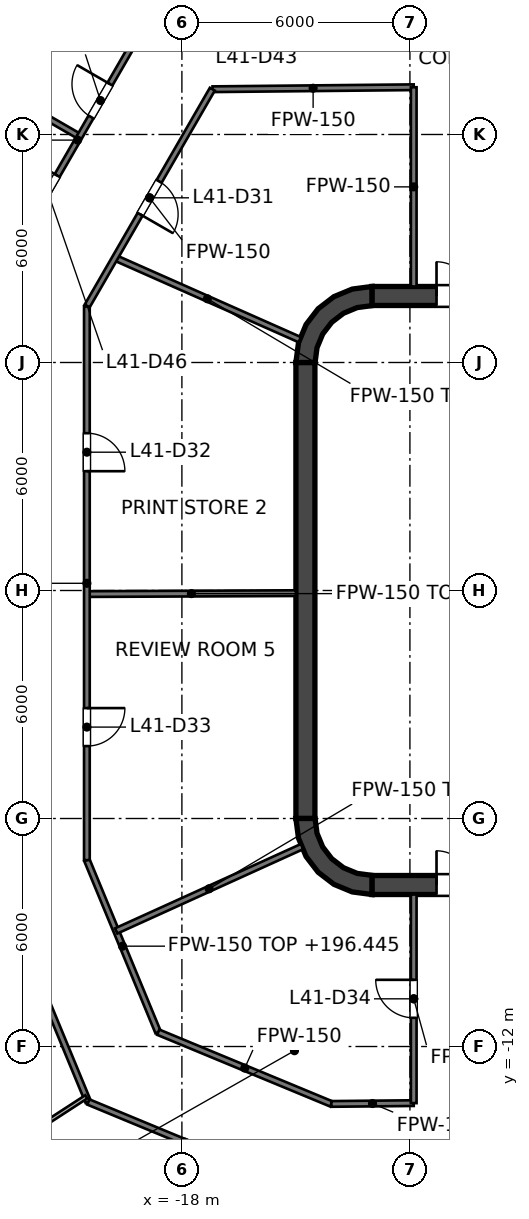
"""IFC4 building model, lengths in metres.
Left out: names, types, materials, properties, quantities, classifications, styles, units other than length and angle.
Written with IfcOpenShell. Run it as: python <this file> out.ifc"""

import sys

from ifc_helpers import new_model, si_unit, direction, frame, frame_2d, origin, place, context, subcontext, project, spatial, polyline, rectangle, outline, extrude, element, fill, save


model = new_model("IFC4")
c1 = context("Model", 3, precision=1e-05, world=origin(), true_north=direction((0.0, 1.0)))
c2 = subcontext(c1, "Body", "Model", "MODEL_VIEW")
j1 = project(units=[si_unit("LENGTHUNIT", "METRE"), si_unit("PLANEANGLEUNIT", "RADIAN")], contexts=[c1])
p1 = place(None, origin())
s1 = spatial("IfcSite", under=j1, at=p1, CompositionType="ELEMENT")
p2 = place(p1, origin())
s2 = spatial("IfcBuilding", under=s1, at=p2, CompositionType="ELEMENT")
p3 = place(p2, frame((0.0, 0.0, 193.6)))
s3 = spatial("IfcBuildingStorey", under=s2, at=p3, CompositionType="ELEMENT", Elevation=193.6)
p4 = place(p3, frame((-13.0, 7.75, 0.0), z_axis=(0.0, 0.0, 1.0), x_axis=(1.0, 0.0, 0.0)))
e1 = element("IfcWall", 1, at=p4, inside=s3, PredefinedType="SHEAR", context=c2, shape_type="SweptSolid", body=[
    extrude(rectangle(XDim=26.0, YDim=0.5, at=frame_2d((13.0, 0.0))), origin(), (0.0, 0.0, 1.0), 4.0),
])
p5 = place(p4, frame((1.7, 0.0, 0.0)))
e2 = element("IfcOpeningElement", 2, at=p5, cuts=e1, PredefinedType="OPENING", context=c2, shape_type="SweptSolid", body=[
    extrude(rectangle(XDim=1.8, YDim=2.1, at=frame_2d((0.9, 1.05))), frame((0.0, 0.25, 0.0), z_axis=(0.0, -1.0, 0.0), x_axis=(1.0, 0.0, 0.0)), (0.0, 0.0, 1.0), 0.5),
])
p6 = place(p4, frame((22.5, 0.0, 0.0)))
e3 = element("IfcOpeningElement", 3, at=p6, cuts=e1, PredefinedType="OPENING", context=c2, shape_type="SweptSolid", body=[
    extrude(rectangle(XDim=1.8, YDim=2.1, at=frame_2d((0.9, 1.05))), frame((0.0, 0.25, 0.0), z_axis=(0.0, -1.0, 0.0), x_axis=(1.0, 0.0, 0.0)), (0.0, 0.0, 1.0), 0.5),
])
p7 = place(p3, frame((-13.0, -7.75, 0.0), z_axis=(0.0, 0.0, 1.0), x_axis=(1.0, 0.0, 0.0)))
e4 = element("IfcWall", 4, at=p7, inside=s3, PredefinedType="SHEAR", context=c2, shape_type="SweptSolid", body=[
    extrude(rectangle(XDim=26.0, YDim=0.5, at=frame_2d((13.0, 0.0))), origin(), (0.0, 0.0, 1.0), 4.0),
])
p8 = place(p7, frame((1.7, 0.0, 0.0)))
e5 = element("IfcOpeningElement", 5, at=p8, cuts=e4, PredefinedType="OPENING", context=c2, shape_type="SweptSolid", body=[
    extrude(rectangle(XDim=1.8, YDim=2.1, at=frame_2d((0.9, 1.05))), frame((0.0, 0.25, 0.0), z_axis=(0.0, -1.0, 0.0), x_axis=(1.0, 0.0, 0.0)), (0.0, 0.0, 1.0), 0.5),
])
p9 = place(p7, frame((22.5, 0.0, 0.0)))
e6 = element("IfcOpeningElement", 6, at=p9, cuts=e4, PredefinedType="OPENING", context=c2, shape_type="SweptSolid", body=[
    extrude(rectangle(XDim=1.8, YDim=2.1, at=frame_2d((0.9, 1.05))), frame((0.0, 0.25, 0.0), z_axis=(0.0, -1.0, 0.0), x_axis=(1.0, 0.0, 0.0)), (0.0, 0.0, 1.0), 0.5),
])
p10 = place(p3, frame((-14.75, -6.0, 0.0), z_axis=(0.0, 0.0, 1.0), x_axis=(0.0, 1.0, 0.0)))
e7 = element("IfcWall", 7, at=p10, inside=s3, PredefinedType="SHEAR", context=c2, shape_type="SweptSolid", body=[
    extrude(rectangle(XDim=12.0, YDim=0.5, at=frame_2d((6.0, 0.0))), origin(), (0.0, 0.0, 1.0), 4.0),
])
p11 = place(p3, origin())
e8 = element("IfcWall", 8, at=p11, inside=s3, PredefinedType="SHEAR", context=c2, shape_type="SweptSolid", body=[
    extrude(outline(polyline([(-15.0, 6.0), (-14.496, 6.0), (-14.445, 6.387), (-14.295, 6.748), (-14.058, 7.058), (-13.748, 7.295), (-13.387, 7.445), (-13.0, 7.496), (-13.0, 8.0), (-13.518, 7.932), (-14.0, 7.732), (-14.414, 7.414), (-14.732, 7.0), (-14.932, 6.518), (-15.0, 6.0)])), origin(), (0.0, 0.0, 1.0), 4.0),
])
e9 = element("IfcWall", 9, at=p11, inside=s3, PredefinedType="SHEAR", context=c2, shape_type="SweptSolid", body=[
    extrude(outline(polyline([(-13.0, -8.0), (-13.0, -7.496), (-13.387, -7.445), (-13.748, -7.295), (-14.058, -7.058), (-14.295, -6.748), (-14.445, -6.387), (-14.496, -6.0), (-15.0, -6.0), (-14.932, -6.518), (-14.732, -7.0), (-14.414, -7.414), (-14.0, -7.732), (-13.518, -7.932), (-13.0, -8.0)])), origin(), (0.0, 0.0, 1.0), 4.0),
])
p12 = place(p3, frame((-11.8, -7.5, 0.0), z_axis=(0.0, 0.0, 1.0), x_axis=(0.0, 1.0, 0.0)))
e10 = element("IfcWall", 10, at=p12, inside=s3, PredefinedType="SOLIDWALL", context=c2, shape_type="SweptSolid", body=[
    extrude(rectangle(XDim=15.0, YDim=0.4, at=frame_2d((7.5, 0.0))), origin(), (0.0, 0.0, 1.0), 3.7),
])
p13 = place(p12, frame((11.3, 0.0, 0.0)))
e11 = element("IfcOpeningElement", 11, at=p13, cuts=e10, PredefinedType="OPENING", context=c2, shape_type="SweptSolid", body=[
    extrude(rectangle(XDim=1.1, YDim=2.1, at=frame_2d((0.55, 1.05))), frame((0.0, 0.2, 0.0), z_axis=(0.0, -1.0, 0.0), x_axis=(1.0, 0.0, 0.0)), (0.0, 0.0, 1.0), 0.4),
])
p14 = place(p12, frame((8.4, 0.0, 0.0)))
e12 = element("IfcOpeningElement", 12, at=p14, cuts=e10, PredefinedType="OPENING", context=c2, shape_type="SweptSolid", body=[
    extrude(rectangle(XDim=1.1, YDim=2.1, at=frame_2d((0.55, 1.05))), frame((0.0, 0.2, 0.0), z_axis=(0.0, -1.0, 0.0), x_axis=(1.0, 0.0, 0.0)), (0.0, 0.0, 1.0), 0.4),
])
p15 = place(p12, frame((5.5, 0.0, 0.0)))
e13 = element("IfcOpeningElement", 13, at=p15, cuts=e10, PredefinedType="OPENING", context=c2, shape_type="SweptSolid", body=[
    extrude(rectangle(XDim=1.1, YDim=2.1, at=frame_2d((0.55, 1.05))), frame((0.0, 0.2, 0.0), z_axis=(0.0, -1.0, 0.0), x_axis=(1.0, 0.0, 0.0)), (0.0, 0.0, 1.0), 0.4),
])
p16 = place(p12, frame((13.697, 0.0, 0.0)))
e14 = element("IfcOpeningElement", 14, at=p16, cuts=e10, PredefinedType="OPENING", context=c2, shape_type="SweptSolid", body=[
    extrude(rectangle(XDim=0.9, YDim=2.1, at=frame_2d((0.45, 1.05))), frame((0.0, 0.2, 0.0), z_axis=(0.0, -1.0, 0.0), x_axis=(1.0, 0.0, 0.0)), (0.0, 0.0, 1.0), 0.4),
])
p17 = place(p12, frame((0.403, 0.0, 0.0)))
e15 = element("IfcOpeningElement", 15, at=p17, cuts=e10, PredefinedType="OPENING", context=c2, shape_type="SweptSolid", body=[
    extrude(rectangle(XDim=0.9, YDim=2.1, at=frame_2d((0.45, 1.05))), frame((0.0, 0.2, 0.0), z_axis=(0.0, -1.0, 0.0), x_axis=(1.0, 0.0, 0.0)), (0.0, 0.0, 1.0), 0.4),
])
e16 = element("IfcWall", 16, at=p11, inside=s3, PredefinedType="SOLIDWALL", context=c2, shape_type="SweptSolid", body=[
    extrude(outline(polyline([(-12.0, -5.925), (-12.0, -5.675), (-14.25, -5.675), (-14.25, -3.025), (-12.0, -3.025), (-12.0, -2.775), (-14.25, -2.775), (-14.25, -0.125), (-12.0, -0.125), (-12.0, 0.125), (-14.25, 0.125), (-14.25, 2.775), (-12.0, 2.775), (-12.0, 3.025), (-14.25, 3.025), (-14.25, 5.675), (-12.0, 5.675), (-12.0, 5.925), (-14.25, 5.925), (-14.5, 5.925), (-14.5, 5.675), (-14.5, 3.025), (-14.5, 2.775), (-14.5, 0.125), (-14.5, -0.125), (-14.5, -2.775), (-14.5, -3.025), (-14.5, -5.675), (-14.5, -5.925), (-14.25, -5.925), (-12.0, -5.925)])), origin(), (0.0, 0.0, 1.0), 3.7),
])
p18 = place(p3, frame((-22.9, -7.572, 0.0), z_axis=(0.0, 0.0, 1.0), x_axis=(0.382367581622, -0.924010298928, 0.0)))
e17 = element("IfcWall", 17, at=p18, inside=s3, PredefinedType="PARTITIONING", context=c2, shape_type="SweptSolid", body=[
    extrude(rectangle(XDim=6.374, YDim=0.15, at=frame_2d((3.187, 0.0))), origin(), (0.0, 0.0, 1.0), 2.777),
])
p19 = place(p18, frame((2.6, 0.0, 0.0)))
e18 = element("IfcOpeningElement", 18, at=p19, cuts=e17, PredefinedType="OPENING", context=c2, shape_type="SweptSolid", body=[
    extrude(rectangle(XDim=1.0, YDim=2.1, at=frame_2d((0.5, 1.05))), frame((0.0, 0.075, 0.0), z_axis=(0.0, -1.0, 0.0), x_axis=(1.0, 0.0, 0.0)), (0.0, 0.0, 1.0), 0.15),
])
p20 = place(p3, frame((-20.5, -7.095, 0.0), z_axis=(0.0, 0.0, 1.0), x_axis=(0.382364990163, -0.924011371303, 0.0)))
e19 = element("IfcWall", 19, at=p20, inside=s3, PredefinedType="PARTITIONING", context=c2, shape_type="SweptSolid", body=[
    extrude(rectangle(XDim=4.902, YDim=0.15, at=frame_2d((2.451, 0.0))), origin(), (0.0, 0.0, 1.0), 2.845),
])
p21 = place(p3, frame((-24.433, 14.106, 0.0), z_axis=(0.0, 0.0, 1.0), x_axis=(0.866048255864, -0.499960416948, 0.0)))
e20 = element("IfcWall", 20, at=p21, inside=s3, PredefinedType="PARTITIONING", context=c2, shape_type="SweptSolid", body=[
    extrude(rectangle(XDim=4.322, YDim=0.15, at=frame_2d((2.161, 0.0))), origin(), (0.0, 0.0, 1.0), 2.845),
])
p22 = place(p3, frame((-19.76, 8.755, 0.0), z_axis=(0.0, 0.0, 1.0), x_axis=(0.91424834547, -0.405154245695, 0.0)))
e21 = element("IfcWall", 21, at=p22, inside=s3, PredefinedType="PARTITIONING", context=c2, shape_type="SweptSolid", body=[
    extrude(rectangle(XDim=5.318, YDim=0.15, at=frame_2d((2.659, 0.0))), origin(), (0.0, 0.0, 1.0), 2.845),
])
p23 = place(p3, frame((-20.46, -13.46, 0.0), z_axis=(0.0, 0.0, 1.0), x_axis=(0.923801547606, -0.382871650349, 0.0)))
e22 = element("IfcWall", 22, at=p23, inside=s3, PredefinedType="PARTITIONING", context=c2, shape_type="SweptSolid", body=[
    extrude(rectangle(XDim=6.415, YDim=0.15, at=frame_2d((3.208, 0.0))), origin(), (0.0, 0.0, 1.0), 2.777),
])
p24 = place(p23, frame((2.707, 0.0, 0.0)))
e23 = element("IfcOpeningElement", 23, at=p24, cuts=e22, PredefinedType="OPENING", context=c2, shape_type="SweptSolid", body=[
    extrude(rectangle(XDim=1.0, YDim=2.1, at=frame_2d((0.5, 1.05))), frame((0.0, 0.075, 0.0), z_axis=(0.0, -1.0, 0.0), x_axis=(1.0, 0.0, 0.0)), (0.0, 0.0, 1.0), 0.15),
])
p25 = place(p3, frame((-18.623, -11.623, 0.0), z_axis=(0.0, 0.0, 1.0), x_axis=(0.923791670587, -0.38289548098, 0.0)))
e24 = element("IfcWall", 24, at=p25, inside=s3, PredefinedType="PARTITIONING", context=c2, shape_type="SweptSolid", body=[
    extrude(rectangle(XDim=4.931, YDim=0.15, at=frame_2d((2.465, 0.0))), origin(), (0.0, 0.0, 1.0), 2.777),
])
p26 = place(p3, frame((-20.5, -0.094, 0.0), z_axis=(0.0, 0.0, 1.0), x_axis=(0.999990148138, 0.004438876723, 0.0)))
e25 = element("IfcWall", 25, at=p26, inside=s3, PredefinedType="PARTITIONING", context=c2, shape_type="SweptSolid", body=[
    extrude(rectangle(XDim=5.5, YDim=0.15, at=frame_2d((2.75, 0.0))), origin(), (0.0, 0.0, 1.0), 2.768),
])
p27 = place(p3, frame((-14.068, -13.511, 0.0), z_axis=(0.0, 0.0, 1.0), x_axis=(0.999950911515, 0.009908307647, 0.0)))
e26 = element("IfcWall", 26, at=p27, inside=s3, PredefinedType="PARTITIONING", context=c2, shape_type="SweptSolid", body=[
    extrude(rectangle(XDim=2.168, YDim=0.15, at=frame_2d((1.084, 0.0))), origin(), (0.0, 0.0, 1.0), 2.777),
])
p28 = place(p3, frame((-17.194, 13.191, 0.0), z_axis=(0.0, 0.0, 1.0), x_axis=(0.999950853109, 0.009914200296, 0.0)))
e27 = element("IfcWall", 27, at=p28, inside=s3, PredefinedType="PARTITIONING", context=c2, shape_type="SweptSolid", body=[
    extrude(rectangle(XDim=5.294, YDim=0.15, at=frame_2d((2.647, 0.0))), origin(), (0.0, 0.0, 1.0), 2.777),
])
p29 = place(p3, frame((-19.728, -8.958, 0.0), z_axis=(0.0, 0.0, 1.0), x_axis=(0.910629511797, 0.413223779863, 0.0)))
e28 = element("IfcWall", 28, at=p29, inside=s3, PredefinedType="PARTITIONING", context=c2, shape_type="SweptSolid", body=[
    extrude(rectangle(XDim=5.368, YDim=0.15, at=frame_2d((2.684, 0.0))), origin(), (0.0, 0.0, 1.0), 3.7),
])
p30 = place(p3, frame((-20.5, 7.474, 0.0), z_axis=(0.0, 0.0, 1.0), x_axis=(0.499957196903, 0.866050114754, 0.0)))
e29 = element("IfcWall", 29, at=p30, inside=s3, PredefinedType="PARTITIONING", context=c2, shape_type="SweptSolid", body=[
    extrude(rectangle(XDim=6.602, YDim=0.15, at=frame_2d((3.301, 0.0))), origin(), (0.0, 0.0, 1.0), 2.777),
])
p31 = place(p30, frame((2.802, 0.0, 0.0)))
e30 = element("IfcOpeningElement", 30, at=p31, cuts=e29, PredefinedType="OPENING", context=c2, shape_type="SweptSolid", body=[
    extrude(rectangle(XDim=1.0, YDim=2.1, at=frame_2d((0.5, 1.05))), frame((0.0, 0.075, 0.0), z_axis=(0.0, -1.0, 0.0), x_axis=(1.0, 0.0, 0.0)), (0.0, 0.0, 1.0), 0.15),
])
p32 = place(p3, frame((-22.9, 8.117, 0.0), z_axis=(0.0, 0.0, 1.0), x_axis=(0.499950307977, 0.866054091587, 0.0)))
e31 = element("IfcWall", 31, at=p32, inside=s3, PredefinedType="PARTITIONING", context=c2, shape_type="SweptSolid", body=[
    extrude(rectangle(XDim=8.626, YDim=0.15, at=frame_2d((4.313, 0.0))), origin(), (0.0, 0.0, 1.0), 2.777),
])
p33 = place(p32, frame((5.015, 0.0, 0.0)))
e32 = element("IfcOpeningElement", 32, at=p33, cuts=e31, PredefinedType="OPENING", context=c2, shape_type="SweptSolid", body=[
    extrude(rectangle(XDim=1.0, YDim=2.1, at=frame_2d((0.5, 1.05))), frame((0.0, 0.075, 0.0), z_axis=(0.0, -1.0, 0.0), x_axis=(1.0, 0.0, 0.0)), (0.0, 0.0, 1.0), 0.15),
])
p34 = place(p32, frame((2.237, 0.0, 0.0)))
e33 = element("IfcOpeningElement", 33, at=p34, cuts=e31, PredefinedType="OPENING", context=c2, shape_type="SweptSolid", body=[
    extrude(rectangle(XDim=1.0, YDim=2.1, at=frame_2d((0.5, 1.05))), frame((0.0, 0.075, 0.0), z_axis=(0.0, -1.0, 0.0), x_axis=(1.0, 0.0, 0.0)), (0.0, 0.0, 1.0), 0.15),
])
p35 = place(p3, frame((-11.9, -13.49, 0.0), z_axis=(0.0, 0.0, 1.0), x_axis=(0.0, 1.0, 0.0)))
e34 = element("IfcWall", 34, at=p35, inside=s3, PredefinedType="PARTITIONING", context=c2, shape_type="SweptSolid", body=[
    extrude(rectangle(XDim=5.49, YDim=0.15, at=frame_2d((2.745, 0.0))), origin(), (0.0, 0.0, 1.0), 2.777),
])
p36 = place(p35, frame((2.245, 0.0, 0.0)))
e35 = element("IfcOpeningElement", 35, at=p36, cuts=e34, PredefinedType="OPENING", context=c2, shape_type="SweptSolid", body=[
    extrude(rectangle(XDim=1.0, YDim=2.1, at=frame_2d((0.5, 1.05))), frame((0.0, 0.075, 0.0), z_axis=(0.0, -1.0, 0.0), x_axis=(1.0, 0.0, 0.0)), (0.0, 0.0, 1.0), 0.15),
])
p37 = place(p3, frame((-11.9, 8.0, 0.0), z_axis=(0.0, 0.0, 1.0), x_axis=(0.0, 1.0, 0.0)))
e36 = element("IfcWall", 36, at=p37, inside=s3, PredefinedType="PARTITIONING", context=c2, shape_type="SweptSolid", body=[
    extrude(rectangle(XDim=5.243, YDim=0.15, at=frame_2d((2.622, 0.0))), origin(), (0.0, 0.0, 1.0), 2.777),
])
p38 = place(p3, frame((-20.5, -7.095, 0.0), z_axis=(0.0, 0.0, 1.0), x_axis=(0.0, 1.0, 0.0)))
e37 = element("IfcWall", 37, at=p38, inside=s3, PredefinedType="PARTITIONING", context=c2, shape_type="SweptSolid", body=[
    extrude(rectangle(XDim=14.569, YDim=0.15, at=frame_2d((7.285, 0.0))), origin(), (0.0, 0.0, 1.0), 2.768),
])
p39 = place(p38, frame((10.234, 0.0, 0.0)))
e38 = element("IfcOpeningElement", 38, at=p39, cuts=e37, PredefinedType="OPENING", context=c2, shape_type="SweptSolid", body=[
    extrude(rectangle(XDim=1.0, YDim=2.1, at=frame_2d((0.5, 1.05))), frame((0.0, 0.075, 0.0), z_axis=(0.0, -1.0, 0.0), x_axis=(1.0, 0.0, 0.0)), (0.0, 0.0, 1.0), 0.15),
])
p40 = place(p38, frame((3.0, 0.0, 0.0)))
e39 = element("IfcOpeningElement", 39, at=p40, cuts=e37, PredefinedType="OPENING", context=c2, shape_type="SweptSolid", body=[
    extrude(rectangle(XDim=1.0, YDim=2.1, at=frame_2d((0.5, 1.05))), frame((0.0, 0.075, 0.0), z_axis=(0.0, -1.0, 0.0), x_axis=(1.0, 0.0, 0.0)), (0.0, 0.0, 1.0), 0.15),
])
p41 = place(p3, frame((-23.271, -15.113, 0.0), z_axis=(0.0, 0.0, 1.0), x_axis=(0.83866769183, 0.544643463819, 0.0)))
e40 = element("IfcWall", 40, at=p41, inside=s3, PredefinedType="PARTITIONING", context=c2, shape_type="SweptSolid", body=[
    extrude(rectangle(XDim=3.285, YDim=0.1, at=frame_2d((1.643, 0.0))), origin(), (0.0, 0.0, 1.0), 3.273),
])
p42 = place(p13, origin())
e41 = element("IfcDoor", 41, at=p42, inside=s3, OperationType="DOUBLE_DOOR_SLIDING", PredefinedType="DOOR", context=c2, shape_type="SweptSolid", body=[
    extrude(rectangle(XDim=1.1, YDim=2.1, at=frame_2d((0.55, 1.05))), frame((0.0, 0.025, 0.0), z_axis=(0.0, -1.0, 0.0), x_axis=(1.0, 0.0, 0.0)), (0.0, 0.0, 1.0), 0.05),
])
fill(e11, e41)
p43 = place(p14, origin())
e42 = element("IfcDoor", 42, at=p43, inside=s3, OperationType="DOUBLE_DOOR_SLIDING", PredefinedType="DOOR", context=c2, shape_type="SweptSolid", body=[
    extrude(rectangle(XDim=1.1, YDim=2.1, at=frame_2d((0.55, 1.05))), frame((0.0, 0.025, 0.0), z_axis=(0.0, -1.0, 0.0), x_axis=(1.0, 0.0, 0.0)), (0.0, 0.0, 1.0), 0.05),
])
fill(e12, e42)
p44 = place(p15, origin())
e43 = element("IfcDoor", 43, at=p44, inside=s3, OperationType="DOUBLE_DOOR_SLIDING", PredefinedType="DOOR", context=c2, shape_type="SweptSolid", body=[
    extrude(rectangle(XDim=1.1, YDim=2.1, at=frame_2d((0.55, 1.05))), frame((0.0, 0.025, 0.0), z_axis=(0.0, -1.0, 0.0), x_axis=(1.0, 0.0, 0.0)), (0.0, 0.0, 1.0), 0.05),
])
fill(e13, e43)
p45 = place(p16, origin())
e44 = element("IfcDoor", 44, at=p45, inside=s3, OperationType="SINGLE_SWING_LEFT", PredefinedType="DOOR", context=c2, shape_type="SweptSolid", body=[
    extrude(rectangle(XDim=0.9, YDim=2.1, at=frame_2d((0.45, 1.05))), frame((0.0, 0.025, 0.0), z_axis=(0.0, -1.0, 0.0), x_axis=(1.0, 0.0, 0.0)), (0.0, 0.0, 1.0), 0.05),
])
fill(e14, e44)
p46 = place(p17, origin())
e45 = element("IfcDoor", 45, at=p46, inside=s3, OperationType="SINGLE_SWING_LEFT", PredefinedType="DOOR", context=c2, shape_type="SweptSolid", body=[
    extrude(rectangle(XDim=0.9, YDim=2.1, at=frame_2d((0.45, 1.05))), frame((0.0, 0.025, 0.0), z_axis=(0.0, -1.0, 0.0), x_axis=(1.0, 0.0, 0.0)), (0.0, 0.0, 1.0), 0.05),
])
fill(e15, e45)
p47 = place(p5, origin())
e46 = element("IfcDoor", 46, at=p47, inside=s3, OperationType="DOUBLE_DOOR_SINGLE_SWING", PredefinedType="DOOR", context=c2, shape_type="SweptSolid", body=[
    extrude(rectangle(XDim=1.8, YDim=2.1, at=frame_2d((0.9, 1.05))), frame((0.0, 0.025, 0.0), z_axis=(0.0, -1.0, 0.0), x_axis=(1.0, 0.0, 0.0)), (0.0, 0.0, 1.0), 0.05),
])
fill(e2, e46)
p48 = place(p8, origin())
e47 = element("IfcDoor", 47, at=p48, inside=s3, OperationType="DOUBLE_DOOR_SINGLE_SWING", PredefinedType="DOOR", context=c2, shape_type="SweptSolid", body=[
    extrude(rectangle(XDim=1.8, YDim=2.1, at=frame_2d((0.9, 1.05))), frame((0.0, 0.025, 0.0), z_axis=(0.0, -1.0, 0.0), x_axis=(1.0, 0.0, 0.0)), (0.0, 0.0, 1.0), 0.05),
])
fill(e5, e47)
p49 = place(p31, origin())
e48 = element("IfcDoor", 48, at=p49, inside=s3, OperationType="SINGLE_SWING_LEFT", PredefinedType="DOOR", context=c2, shape_type="SweptSolid", body=[
    extrude(rectangle(XDim=1.0, YDim=2.1, at=frame_2d((0.5, 1.05))), frame((0.0, 0.025, 0.0), z_axis=(0.0, -1.0, 0.0), x_axis=(1.0, 0.0, 0.0)), (0.0, 0.0, 1.0), 0.05),
])
fill(e30, e48)
p50 = place(p39, origin())
e49 = element("IfcDoor", 49, at=p50, inside=s3, OperationType="SINGLE_SWING_LEFT", PredefinedType="DOOR", context=c2, shape_type="SweptSolid", body=[
    extrude(rectangle(XDim=1.0, YDim=2.1, at=frame_2d((0.5, 1.05))), frame((0.0, 0.025, 0.0), z_axis=(0.0, -1.0, 0.0), x_axis=(1.0, 0.0, 0.0)), (0.0, 0.0, 1.0), 0.05),
])
fill(e38, e49)
p51 = place(p40, origin())
e50 = element("IfcDoor", 50, at=p51, inside=s3, OperationType="SINGLE_SWING_RIGHT", PredefinedType="DOOR", context=c2, shape_type="SweptSolid", body=[
    extrude(rectangle(XDim=1.0, YDim=2.1, at=frame_2d((0.5, 1.05))), frame((0.0, 0.025, 0.0), z_axis=(0.0, -1.0, 0.0), x_axis=(1.0, 0.0, 0.0)), (0.0, 0.0, 1.0), 0.05),
])
fill(e39, e50)
p52 = place(p36, origin())
e51 = element("IfcDoor", 51, at=p52, inside=s3, OperationType="SINGLE_SWING_RIGHT", PredefinedType="DOOR", context=c2, shape_type="SweptSolid", body=[
    extrude(rectangle(XDim=1.0, YDim=2.1, at=frame_2d((0.5, 1.05))), frame((0.0, 0.025, 0.0), z_axis=(0.0, -1.0, 0.0), x_axis=(1.0, 0.0, 0.0)), (0.0, 0.0, 1.0), 0.05),
])
fill(e35, e51)
p53 = place(p33, origin())
e52 = element("IfcDoor", 52, at=p53, inside=s3, OperationType="SINGLE_SWING_RIGHT", PredefinedType="DOOR", context=c2, shape_type="SweptSolid", body=[
    extrude(rectangle(XDim=1.0, YDim=2.1, at=frame_2d((0.5, 1.05))), frame((0.0, 0.025, 0.0), z_axis=(0.0, -1.0, 0.0), x_axis=(1.0, 0.0, 0.0)), (0.0, 0.0, 1.0), 0.05),
])
fill(e32, e52)
p54 = place(p34, origin())
e53 = element("IfcDoor", 53, at=p54, inside=s3, OperationType="SINGLE_SWING_RIGHT", PredefinedType="DOOR", context=c2, shape_type="SweptSolid", body=[
    extrude(rectangle(XDim=1.0, YDim=2.1, at=frame_2d((0.5, 1.05))), frame((0.0, 0.025, 0.0), z_axis=(0.0, -1.0, 0.0), x_axis=(1.0, 0.0, 0.0)), (0.0, 0.0, 1.0), 0.05),
])
fill(e33, e53)
save(model, sys.argv[1])
